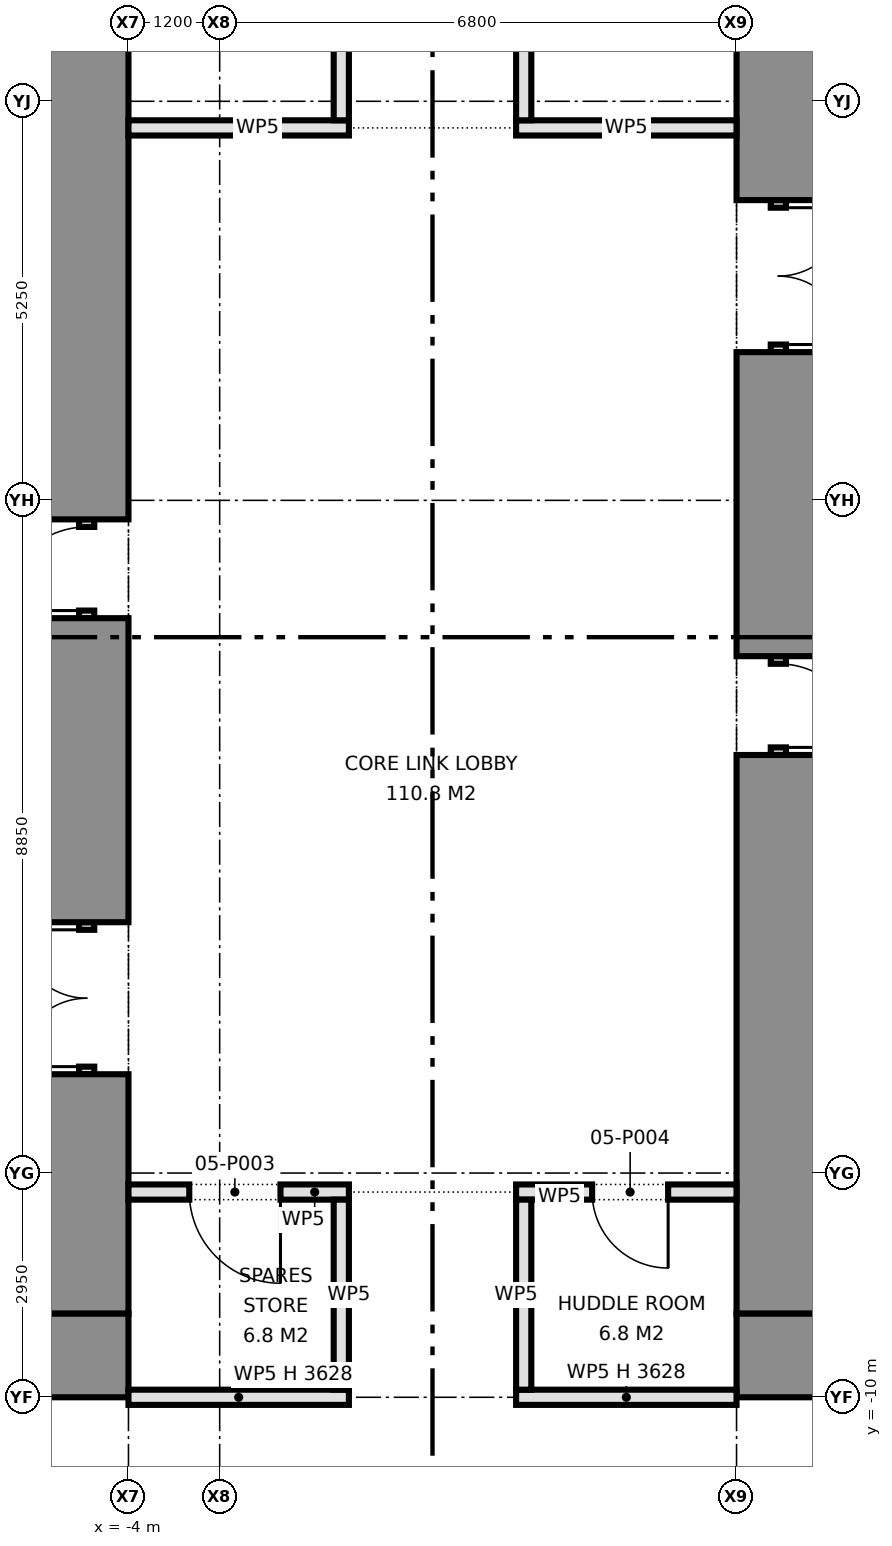
"""IFC4 building model, lengths in metres.
Left out: names, types, materials, properties, quantities, classifications, styles, units other than length and angle.
Written with IfcOpenShell. Run it as: python <this file> out.ifc"""

import sys

from ifc_helpers import new_model, si_unit, direction, frame, frame_2d, origin, place, context, subcontext, project, spatial, rectangle, extrude, element, fill, save


model = new_model("IFC4")
c1 = context("Model", 3, precision=1e-05, world=origin(), true_north=direction((0.0, 1.0)))
c2 = subcontext(c1, "Body", "Model", "MODEL_VIEW")
j1 = project(units=[si_unit("LENGTHUNIT", "METRE"), si_unit("PLANEANGLEUNIT", "RADIAN")], contexts=[c1])
p1 = place(None, origin())
s1 = spatial("IfcSite", under=j1, at=p1, CompositionType="ELEMENT")
p2 = place(p1, origin())
s2 = spatial("IfcBuilding", under=s1, at=p2, CompositionType="ELEMENT")
p3 = place(p2, frame((0.0, 0.0, 20.9)))
s3 = spatial("IfcBuildingStorey", under=s2, at=p3, CompositionType="ELEMENT", Elevation=20.9)
p4 = place(p3, frame((-15.0, -9.45, 0.0), z_axis=(0.0, 0.0, 1.0), x_axis=(1.0, 0.0, 0.0)))
e1 = element("IfcWall", 1, at=p4, inside=s3, PredefinedType="SHEAR", context=c2, shape_type="SweptSolid", body=[
    extrude(rectangle(XDim=11.0, YDim=1.1, at=frame_2d((5.5, 0.0))), origin(), (0.0, 0.0, 1.0), 4.575),
])
p5 = place(p3, frame((-4.55, -8.9, 0.0), z_axis=(0.0, 0.0, 1.0), x_axis=(0.0, 1.0, 0.0)))
e2 = element("IfcWall", 2, at=p5, inside=s3, PredefinedType="SHEAR", context=c2, shape_type="SweptSolid", body=[
    extrude(rectangle(XDim=3.15, YDim=1.1, at=frame_2d((1.575, 0.0))), origin(), (0.0, 0.0, 1.0), 4.575),
])
p6 = place(p3, frame((-4.55, -5.75, 0.0), z_axis=(0.0, 0.0, 1.0), x_axis=(0.0, 1.0, 0.0)))
e3 = element("IfcWall", 3, at=p6, inside=s3, PredefinedType="PARTITIONING", context=c2, shape_type="SweptSolid", body=[
    extrude(rectangle(XDim=2.0, YDim=0.2, at=frame_2d((1.0, 0.0))), origin(), (0.0, 0.0, 1.0), 2.4),
])
p7 = place(p6, frame((0.1, 0.0, 0.0)))
e4 = element("IfcOpeningElement", 4, at=p7, cuts=e3, PredefinedType="OPENING", context=c2, shape_type="SweptSolid", body=[
    extrude(rectangle(XDim=1.8, YDim=2.1, at=frame_2d((0.9, 1.05))), frame((0.0, 0.11, 0.0), z_axis=(0.0, -1.0, 0.0), x_axis=(1.0, 0.0, 0.0)), (0.0, 0.0, 1.0), 0.22),
])
p8 = place(p3, frame((-4.55, -3.75, 0.0), z_axis=(0.0, 0.0, 1.0), x_axis=(0.0, 1.0, 0.0)))
e5 = element("IfcWall", 5, at=p8, inside=s3, PredefinedType="SHEAR", context=c2, shape_type="SweptSolid", body=[
    extrude(rectangle(XDim=4.0, YDim=1.1, at=frame_2d((2.0, 0.0))), origin(), (0.0, 0.0, 1.0), 4.575),
])
p9 = place(p3, frame((-4.55, 0.25, 0.0), z_axis=(0.0, 0.0, 1.0), x_axis=(0.0, 1.0, 0.0)))
e6 = element("IfcWall", 6, at=p9, inside=s3, PredefinedType="PARTITIONING", context=c2, shape_type="SweptSolid", body=[
    extrude(rectangle(XDim=1.3, YDim=0.2, at=frame_2d((0.65, 0.0))), origin(), (0.0, 0.0, 1.0), 2.4),
])
p10 = place(p9, frame((0.1, 0.0, 0.0)))
e7 = element("IfcOpeningElement", 7, at=p10, cuts=e6, PredefinedType="OPENING", context=c2, shape_type="SweptSolid", body=[
    extrude(rectangle(XDim=1.1, YDim=2.1, at=frame_2d((0.55, 1.05))), frame((0.0, 0.11, 0.0), z_axis=(0.0, -1.0, 0.0), x_axis=(1.0, 0.0, 0.0)), (0.0, 0.0, 1.0), 0.22),
])
p11 = place(p3, frame((-4.55, 1.55, 0.0), z_axis=(0.0, 0.0, 1.0), x_axis=(0.0, 1.0, 0.0)))
e8 = element("IfcWall", 8, at=p11, inside=s3, PredefinedType="SHEAR", context=c2, shape_type="SweptSolid", body=[
    extrude(rectangle(XDim=7.35, YDim=1.1, at=frame_2d((3.675, 0.0))), origin(), (0.0, 0.0, 1.0), 4.575),
])
p12 = place(p3, frame((15.0, -9.45, 0.0), z_axis=(0.0, 0.0, 1.0), x_axis=(-1.0, 0.0, 0.0)))
e9 = element("IfcWall", 9, at=p12, inside=s3, PredefinedType="SHEAR", context=c2, shape_type="SweptSolid", body=[
    extrude(rectangle(XDim=11.0, YDim=1.1, at=frame_2d((5.5, 0.0))), origin(), (0.0, 0.0, 1.0), 4.575),
])
p13 = place(p3, frame((4.55, 8.9, 0.0), z_axis=(0.0, 0.0, 1.0), x_axis=(0.0, -1.0, 0.0)))
e10 = element("IfcWall", 10, at=p13, inside=s3, PredefinedType="SHEAR", context=c2, shape_type="SweptSolid", body=[
    extrude(rectangle(XDim=3.15, YDim=1.1, at=frame_2d((1.575, 0.0))), origin(), (0.0, 0.0, 1.0), 4.575),
])
p14 = place(p3, frame((4.55, 5.75, 0.0), z_axis=(0.0, 0.0, 1.0), x_axis=(0.0, -1.0, 0.0)))
e11 = element("IfcWall", 11, at=p14, inside=s3, PredefinedType="PARTITIONING", context=c2, shape_type="SweptSolid", body=[
    extrude(rectangle(XDim=2.0, YDim=0.2, at=frame_2d((1.0, 0.0))), origin(), (0.0, 0.0, 1.0), 2.4),
])
p15 = place(p14, frame((0.1, 0.0, 0.0)))
e12 = element("IfcOpeningElement", 12, at=p15, cuts=e11, PredefinedType="OPENING", context=c2, shape_type="SweptSolid", body=[
    extrude(rectangle(XDim=1.8, YDim=2.1, at=frame_2d((0.9, 1.05))), frame((0.0, 0.11, 0.0), z_axis=(0.0, -1.0, 0.0), x_axis=(1.0, 0.0, 0.0)), (0.0, 0.0, 1.0), 0.22),
])
p16 = place(p3, frame((4.55, 3.75, 0.0), z_axis=(0.0, 0.0, 1.0), x_axis=(0.0, -1.0, 0.0)))
e13 = element("IfcWall", 13, at=p16, inside=s3, PredefinedType="SHEAR", context=c2, shape_type="SweptSolid", body=[
    extrude(rectangle(XDim=4.0, YDim=1.1, at=frame_2d((2.0, 0.0))), origin(), (0.0, 0.0, 1.0), 4.575),
])
p17 = place(p3, frame((4.55, -0.25, 0.0), z_axis=(0.0, 0.0, 1.0), x_axis=(0.0, -1.0, 0.0)))
e14 = element("IfcWall", 14, at=p17, inside=s3, PredefinedType="PARTITIONING", context=c2, shape_type="SweptSolid", body=[
    extrude(rectangle(XDim=1.3, YDim=0.2, at=frame_2d((0.65, 0.0))), origin(), (0.0, 0.0, 1.0), 2.4),
])
p18 = place(p17, frame((0.1, 0.0, 0.0)))
e15 = element("IfcOpeningElement", 15, at=p18, cuts=e14, PredefinedType="OPENING", context=c2, shape_type="SweptSolid", body=[
    extrude(rectangle(XDim=1.1, YDim=2.1, at=frame_2d((0.55, 1.05))), frame((0.0, 0.11, 0.0), z_axis=(0.0, -1.0, 0.0), x_axis=(1.0, 0.0, 0.0)), (0.0, 0.0, 1.0), 0.22),
])
p19 = place(p3, frame((4.55, -1.55, 0.0), z_axis=(0.0, 0.0, 1.0), x_axis=(0.0, -1.0, 0.0)))
e16 = element("IfcWall", 16, at=p19, inside=s3, PredefinedType="SHEAR", context=c2, shape_type="SweptSolid", body=[
    extrude(rectangle(XDim=7.35, YDim=1.1, at=frame_2d((3.675, 0.0))), origin(), (0.0, 0.0, 1.0), 4.575),
])
for number, where, z_axis, x_axis in (
    (17, (-4.0, -10.0, 0.0), (0.0, 0.0, 1.0), (1.0, 0.0, 0.0)),
    (18, (1.1, -10.0, 0.0), (0.0, 0.0, 1.0), (1.0, 0.0, 0.0)),
):
    element("IfcWall", number, at=place(p3, frame(where, z_axis=z_axis, x_axis=x_axis)), inside=s3, PredefinedType="PARTITIONING", context=c2, shape_type="SweptSolid", body=[
        extrude(rectangle(XDim=2.9, YDim=0.2, at=frame_2d((1.45, 0.0))), origin(), (0.0, 0.0, 1.0), 3.628),
    ])
p20 = place(p3, frame((-4.0, -7.3, 0.0), z_axis=(0.0, 0.0, 1.0), x_axis=(1.0, 0.0, 0.0)))
e19 = element("IfcWall", 19, at=p20, inside=s3, PredefinedType="PARTITIONING", context=c2, shape_type="SweptSolid", body=[
    extrude(rectangle(XDim=2.9, YDim=0.2, at=frame_2d((1.45, 0.0))), origin(), (0.0, 0.0, 1.0), 4.575),
])
p21 = place(p20, frame((0.8, 0.0, 0.0)))
e20 = element("IfcOpeningElement", 20, at=p21, cuts=e19, PredefinedType="OPENING", context=c2, shape_type="SweptSolid", body=[
    extrude(rectangle(XDim=1.2, YDim=2.1, at=frame_2d((0.6, 1.05))), frame((0.0, 0.11, 0.0), z_axis=(0.0, -1.0, 0.0), x_axis=(1.0, 0.0, 0.0)), (0.0, 0.0, 1.0), 0.22),
])
p22 = place(p3, frame((1.1, -7.3, 0.0), z_axis=(0.0, 0.0, 1.0), x_axis=(1.0, 0.0, 0.0)))
e21 = element("IfcWall", 21, at=p22, inside=s3, PredefinedType="PARTITIONING", context=c2, shape_type="SweptSolid", body=[
    extrude(rectangle(XDim=2.9, YDim=0.2, at=frame_2d((1.45, 0.0))), origin(), (0.0, 0.0, 1.0), 4.575),
])
p23 = place(p22, frame((1.0, 0.0, 0.0)))
e22 = element("IfcOpeningElement", 22, at=p23, cuts=e21, PredefinedType="OPENING", context=c2, shape_type="SweptSolid", body=[
    extrude(rectangle(XDim=1.0, YDim=2.1, at=frame_2d((0.5, 1.05))), frame((0.0, 0.11, 0.0), z_axis=(0.0, -1.0, 0.0), x_axis=(1.0, 0.0, 0.0)), (0.0, 0.0, 1.0), 0.22),
])
for number, where, z_axis, x_axis in (
    (23, (-4.0, 6.7, 0.0), (0.0, 0.0, 1.0), (1.0, 0.0, 0.0)),
    (24, (1.1, 6.7, 0.0), (0.0, 0.0, 1.0), (1.0, 0.0, 0.0)),
):
    element("IfcWall", number, at=place(p3, frame(where, z_axis=z_axis, x_axis=x_axis)), inside=s3, PredefinedType="PARTITIONING", context=c2, shape_type="SweptSolid", body=[
        extrude(rectangle(XDim=2.9, YDim=0.2, at=frame_2d((1.45, 0.0))), origin(), (0.0, 0.0, 1.0), 4.575),
    ])
p24 = place(p3, frame((1.2, -9.9, 0.0), z_axis=(0.0, 0.0, 1.0), x_axis=(0.0, 1.0, 0.0)))
e25 = element("IfcWall", 25, at=p24, inside=s3, PredefinedType="PARTITIONING", context=c2, shape_type="SweptSolid", body=[
    extrude(rectangle(XDim=2.5, YDim=0.2, at=frame_2d((1.25, 0.0))), origin(), (0.0, 0.0, 1.0), 4.575),
])
p25 = place(p3, frame((1.2, 6.8, 0.0), z_axis=(0.0, 0.0, 1.0), x_axis=(0.0, 1.0, 0.0)))
e26 = element("IfcWall", 26, at=p25, inside=s3, PredefinedType="PARTITIONING", context=c2, shape_type="SweptSolid", body=[
    extrude(rectangle(XDim=3.1, YDim=0.2, at=frame_2d((1.55, 0.0))), origin(), (0.0, 0.0, 1.0), 4.575),
])
p26 = place(p25, frame((0.95, 0.0, 0.0)))
e27 = element("IfcOpeningElement", 27, at=p26, cuts=e26, PredefinedType="OPENING", context=c2, shape_type="SweptSolid", body=[
    extrude(rectangle(XDim=1.2, YDim=2.1, at=frame_2d((0.6, 1.05))), frame((0.0, 0.11, 0.0), z_axis=(0.0, -1.0, 0.0), x_axis=(1.0, 0.0, 0.0)), (0.0, 0.0, 1.0), 0.22),
])
p27 = place(p3, frame((-1.2, -9.9, 0.0), z_axis=(0.0, 0.0, 1.0), x_axis=(0.0, 1.0, 0.0)))
e28 = element("IfcWall", 28, at=p27, inside=s3, PredefinedType="PARTITIONING", context=c2, shape_type="SweptSolid", body=[
    extrude(rectangle(XDim=2.5, YDim=0.2, at=frame_2d((1.25, 0.0))), origin(), (0.0, 0.0, 1.0), 4.575),
])
p28 = place(p3, frame((-1.2, 6.8, 0.0), z_axis=(0.0, 0.0, 1.0), x_axis=(0.0, 1.0, 0.0)))
e29 = element("IfcWall", 29, at=p28, inside=s3, PredefinedType="PARTITIONING", context=c2, shape_type="SweptSolid", body=[
    extrude(rectangle(XDim=3.1, YDim=0.2, at=frame_2d((1.55, 0.0))), origin(), (0.0, 0.0, 1.0), 4.575),
])
p29 = place(p28, frame((1.05, 0.0, 0.0)))
e30 = element("IfcOpeningElement", 30, at=p29, cuts=e29, PredefinedType="OPENING", context=c2, shape_type="SweptSolid", body=[
    extrude(rectangle(XDim=1.0, YDim=2.1, at=frame_2d((0.5, 1.05))), frame((0.0, 0.11, 0.0), z_axis=(0.0, -1.0, 0.0), x_axis=(1.0, 0.0, 0.0)), (0.0, 0.0, 1.0), 0.22),
])
p30 = place(p7, origin())
e31 = element("IfcDoor", 31, at=p30, inside=s3, OperationType="DOUBLE_DOOR_SINGLE_SWING", PredefinedType="DOOR", context=c2, shape_type="SweptSolid", body=[
    extrude(rectangle(XDim=1.8, YDim=2.1, at=frame_2d((0.9, 1.05))), frame((0.0, 0.025, 0.0), z_axis=(0.0, -1.0, 0.0), x_axis=(1.0, 0.0, 0.0)), (0.0, 0.0, 1.0), 0.05),
])
fill(e4, e31)
p31 = place(p10, origin())
e32 = element("IfcDoor", 32, at=p31, inside=s3, OperationType="SINGLE_SWING_LEFT", PredefinedType="DOOR", context=c2, shape_type="SweptSolid", body=[
    extrude(rectangle(XDim=1.1, YDim=2.1, at=frame_2d((0.55, 1.05))), frame((0.0, 0.025, 0.0), z_axis=(0.0, -1.0, 0.0), x_axis=(1.0, 0.0, 0.0)), (0.0, 0.0, 1.0), 0.05),
])
fill(e7, e32)
p32 = place(p15, origin())
e33 = element("IfcDoor", 33, at=p32, inside=s3, OperationType="DOUBLE_DOOR_SINGLE_SWING", PredefinedType="DOOR", context=c2, shape_type="SweptSolid", body=[
    extrude(rectangle(XDim=1.8, YDim=2.1, at=frame_2d((0.9, 1.05))), frame((0.0, 0.025, 0.0), z_axis=(0.0, -1.0, 0.0), x_axis=(1.0, 0.0, 0.0)), (0.0, 0.0, 1.0), 0.05),
])
fill(e12, e33)
p33 = place(p18, origin())
e34 = element("IfcDoor", 34, at=p33, inside=s3, OperationType="SINGLE_SWING_RIGHT", PredefinedType="DOOR", context=c2, shape_type="SweptSolid", body=[
    extrude(rectangle(XDim=1.1, YDim=2.1, at=frame_2d((0.55, 1.05))), frame((0.0, 0.025, 0.0), z_axis=(0.0, -1.0, 0.0), x_axis=(1.0, 0.0, 0.0)), (0.0, 0.0, 1.0), 0.05),
])
fill(e15, e34)
p34 = place(p21, frame((1.2, 0.0, 0.0), z_axis=(0.0, 0.0, 1.0), x_axis=(-1.0, 0.0, 0.0)))
e35 = element("IfcDoor", 35, at=p34, inside=s3, OperationType="SINGLE_SWING_LEFT", PredefinedType="DOOR", context=c2, shape_type="SweptSolid", body=[
    extrude(rectangle(XDim=1.2, YDim=2.1, at=frame_2d((0.6, 1.05))), frame((0.0, 0.025, 0.0), z_axis=(0.0, -1.0, 0.0), x_axis=(1.0, 0.0, 0.0)), (0.0, 0.0, 1.0), 0.05),
])
fill(e20, e35)
p35 = place(p23, frame((1.0, 0.0, 0.0), z_axis=(0.0, 0.0, 1.0), x_axis=(-1.0, 0.0, 0.0)))
e36 = element("IfcDoor", 36, at=p35, inside=s3, OperationType="SINGLE_SWING_LEFT", PredefinedType="DOOR", context=c2, shape_type="SweptSolid", body=[
    extrude(rectangle(XDim=1.0, YDim=2.1, at=frame_2d((0.5, 1.05))), frame((0.0, 0.025, 0.0), z_axis=(0.0, -1.0, 0.0), x_axis=(1.0, 0.0, 0.0)), (0.0, 0.0, 1.0), 0.05),
])
fill(e22, e36)
save(model, sys.argv[1])
